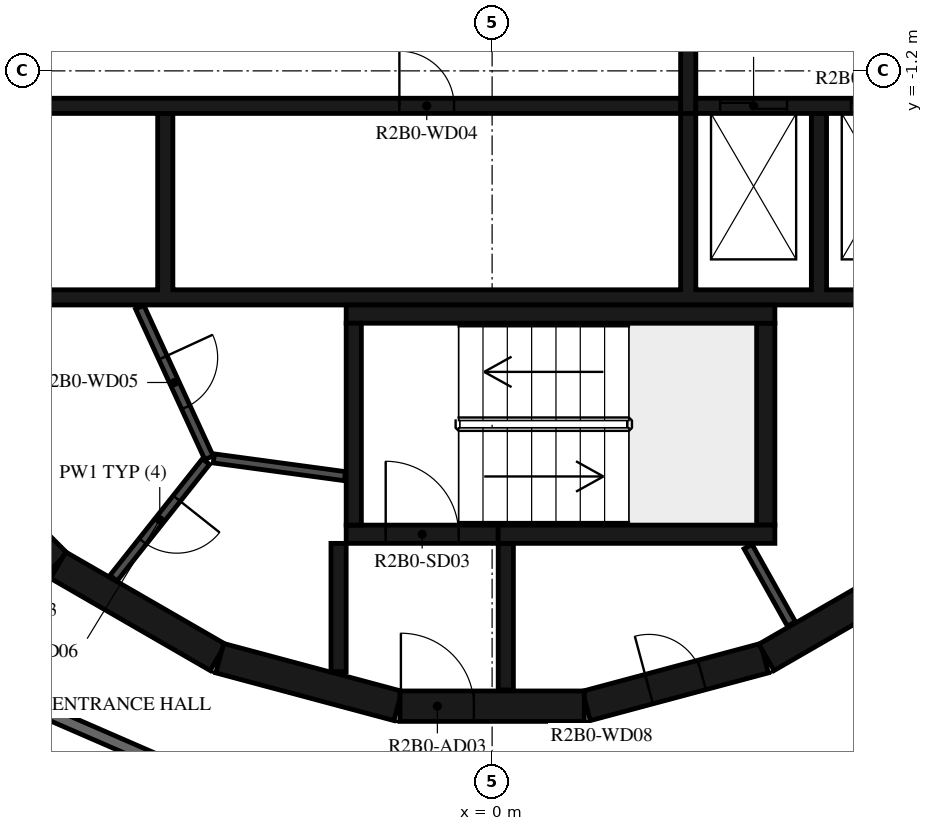
"""IFC4 building model, lengths in metres.
Left out: names, types, materials, properties, quantities, classifications, styles, units other than length and angle.
Written with IfcOpenShell. Run it as: python <this file> out.ifc"""

import sys

from ifc_helpers import new_model, si_unit, direction, frame, frame_2d, origin, place, context, subcontext, project, spatial, polyline, rectangle, outline, extrude, element, fill, save


model = new_model("IFC4")
c1 = context("Model", 3, precision=1e-05, world=origin(), true_north=direction((0.0, 1.0)))
c2 = subcontext(c1, "Body", "Model", "MODEL_VIEW")
j1 = project(units=[si_unit("LENGTHUNIT", "METRE"), si_unit("PLANEANGLEUNIT", "RADIAN")], contexts=[c1])
p1 = place(None, origin())
s1 = spatial("IfcSite", under=j1, at=p1, CompositionType="ELEMENT")
p2 = place(p1, origin())
s2 = spatial("IfcBuilding", under=s1, at=p2, CompositionType="ELEMENT")
p3 = place(p2, frame((0.0, 0.0, 90.7)))
s3 = spatial("IfcBuildingStorey", under=s2, at=p3, CompositionType="ELEMENT", Elevation=90.7)
p4 = place(p3, frame((1.55, -11.643, 0.0), z_axis=(0.0, 0.0, 1.0), x_axis=(0.965948410781, 0.258734743916, 0.0)))
e1 = element("IfcWall", 1, at=p4, inside=s3, PredefinedType="SHEAR", context=c2, shape_type="SweptSolid", body=[
    extrude(rectangle(XDim=3.033, YDim=0.5, at=frame_2d((1.516, 0.0))), origin(), (0.0, 0.0, 1.0), 3.12),
])
p5 = place(p4, frame((1.066, 0.0, 0.0)))
e2 = element("IfcOpeningElement", 2, at=p5, cuts=e1, PredefinedType="OPENING", context=c2, shape_type="SweptSolid", body=[
    extrude(rectangle(XDim=0.9, YDim=2.1, at=frame_2d((0.45, 1.05))), frame((0.0, 0.26, 0.0), z_axis=(0.0, -1.0, 0.0), x_axis=(1.0, 0.0, 0.0)), (0.0, 0.0, 1.0), 0.52),
])
p6 = place(p3, frame((4.51, -10.845, 0.0), z_axis=(0.0, 0.0, 1.0), x_axis=(0.865975092491, 0.500087131594, 0.0)))
e3 = element("IfcWall", 3, at=p6, inside=s3, PredefinedType="SHEAR", context=c2, shape_type="SweptSolid", body=[
    extrude(rectangle(XDim=3.033, YDim=0.5, at=frame_2d((1.516, 0.0))), origin(), (0.0, 0.0, 1.0), 3.12),
])
p7 = place(p3, frame((-9.308, -7.164, 0.0), z_axis=(0.0, 0.0, 1.0), x_axis=(0.707106781187, -0.707106781187, 0.0)))
e4 = element("IfcWall", 4, at=p7, inside=s3, PredefinedType="SHEAR", context=c2, shape_type="SweptSolid", body=[
    extrude(rectangle(XDim=3.032, YDim=0.5, at=frame_2d((1.516, 0.0))), origin(), (0.0, 0.0, 1.0), 3.12),
])
for number, where, z_axis, x_axis in (
    (5, (-7.137, -9.329, 0.0), (0.0, 0.0, 1.0), (0.866, -0.5, 0.0)),
    (6, (-4.479, -10.858, 0.0), (0.0, 0.0, 1.0), (0.966, -0.259, 0.0)),
):
    element("IfcWall", number, at=place(p3, frame(where, z_axis=z_axis, x_axis=x_axis)), inside=s3, PredefinedType="SHEAR", context=c2, shape_type="SweptSolid", body=[
        extrude(rectangle(XDim=3.033, YDim=0.5, at=frame_2d((1.516, 0.0))), origin(), (0.0, 0.0, 1.0), 3.12),
    ])
p8 = place(p3, frame((-1.516, -11.647, 0.0), z_axis=(0.0, 0.0, 1.0), x_axis=(1.0, 0.0, 0.0)))
e7 = element("IfcWall", 7, at=p8, inside=s3, PredefinedType="SHEAR", context=c2, shape_type="SweptSolid", body=[
    extrude(rectangle(XDim=3.033, YDim=0.5, at=frame_2d((1.516, 0.0))), origin(), (0.0, 0.0, 1.0), 3.12),
])
p9 = place(p8, frame((0.016, 0.0, 0.0)))
e8 = element("IfcOpeningElement", 8, at=p9, cuts=e7, PredefinedType="OPENING", context=c2, shape_type="SweptSolid", body=[
    extrude(rectangle(XDim=1.2, YDim=2.1, at=frame_2d((0.6, 1.05))), frame((0.0, 0.26, 0.0), z_axis=(0.0, -1.0, 0.0), x_axis=(1.0, 0.0, 0.0)), (0.0, 0.0, 1.0), 0.52),
])
p10 = place(p3, frame((-2.275, -8.67, 0.0), z_axis=(0.0, 0.0, 1.0), x_axis=(0.0, 1.0, 0.0)))
e9 = element("IfcWall", 9, at=p10, inside=s3, PredefinedType="SHEAR", context=c2, shape_type="SweptSolid", body=[
    extrude(rectangle(XDim=3.32, YDim=0.25, at=frame_2d((1.66, 0.0))), origin(), (0.0, 0.0, 1.0), 3.12),
])
p11 = place(p3, frame((-2.4, -5.2, 0.0), z_axis=(0.0, 0.0, 1.0), x_axis=(1.0, 0.0, 0.0)))
e10 = element("IfcWall", 10, at=p11, inside=s3, PredefinedType="SHEAR", context=c2, shape_type="SweptSolid", body=[
    extrude(rectangle(XDim=7.05, YDim=0.3, at=frame_2d((3.525, 0.0))), origin(), (0.0, 0.0, 1.0), 3.12),
])
p12 = place(p3, frame((4.5, -8.67, 0.0), z_axis=(0.0, 0.0, 1.0), x_axis=(0.0, 1.0, 0.0)))
e11 = element("IfcWall", 11, at=p12, inside=s3, PredefinedType="SHEAR", context=c2, shape_type="SweptSolid", body=[
    extrude(rectangle(XDim=3.32, YDim=0.3, at=frame_2d((1.66, 0.0))), origin(), (0.0, 0.0, 1.0), 3.12),
])
p13 = place(p3, frame((0.1, -8.82, 0.0), z_axis=(0.0, 0.0, 1.0), x_axis=(1.0, 0.0, 0.0)))
e12 = element("IfcWall", 12, at=p13, inside=s3, PredefinedType="SHEAR", context=c2, shape_type="SweptSolid", body=[
    extrude(rectangle(XDim=4.55, YDim=0.3, at=frame_2d((2.275, 0.0))), origin(), (0.0, 0.0, 1.0), 3.12),
])
p14 = place(p3, frame((-2.4, -8.82, 0.0), z_axis=(0.0, 0.0, 1.0), x_axis=(1.0, 0.0, 0.0)))
e13 = element("IfcWall", 13, at=p14, inside=s3, PredefinedType="SHEAR", context=c2, shape_type="SweptSolid", body=[
    extrude(rectangle(XDim=2.5, YDim=0.3, at=frame_2d((1.25, 0.0))), origin(), (0.0, 0.0, 1.0), 3.12),
])
p15 = place(p14, frame((0.65, 0.0, 0.0)))
e14 = element("IfcOpeningElement", 14, at=p15, cuts=e13, PredefinedType="OPENING", context=c2, shape_type="SweptSolid", body=[
    extrude(rectangle(XDim=1.2, YDim=2.1, at=frame_2d((0.6, 1.05))), frame((0.0, 0.16, 0.0), z_axis=(0.0, -1.0, 0.0), x_axis=(1.0, 0.0, 0.0)), (0.0, 0.0, 1.0), 0.32),
])
p16 = place(p3, frame((-2.525, -8.97, 0.0), z_axis=(0.0, 0.0, 1.0), x_axis=(0.0, -1.0, 0.0)))
e15 = element("IfcWall", 15, at=p16, inside=s3, PredefinedType="SHEAR", context=c2, shape_type="SweptSolid", body=[
    extrude(rectangle(XDim=2.11, YDim=0.25, at=frame_2d((1.055, 0.0))), origin(), (0.0, 0.0, 1.0), 3.12),
])
p17 = place(p3, frame((0.225, -8.97, 0.0), z_axis=(0.0, 0.0, 1.0), x_axis=(0.0, -1.0, 0.0)))
e16 = element("IfcWall", 16, at=p17, inside=s3, PredefinedType="SHEAR", context=c2, shape_type="SweptSolid", body=[
    extrude(rectangle(XDim=2.41, YDim=0.25, at=frame_2d((1.205, 0.0))), origin(), (0.0, 0.0, 1.0), 3.12),
])
p18 = place(p3, origin())
e17 = element("IfcWall", 17, at=p18, inside=s3, PredefinedType="SHEAR", context=c2, shape_type="SweptSolid", body=[
    extrude(outline(polyline([(9.8, -5.05), (9.8, -4.8), (9.8, -1.9), (9.55, -1.9), (9.55, -4.8), (7.65, -4.8), (7.65, -1.9), (7.4, -1.9), (7.4, -4.8), (5.5, -4.8), (5.5, -1.9), (5.25, -1.9), (5.25, -4.8), (3.35, -4.8), (3.35, -1.9), (3.1, -1.9), (3.1, -4.8), (-5.25, -4.8), (-5.25, -1.9), (-5.5, -1.9), (-5.5, -4.8), (-7.4, -4.8), (-7.4, -1.9), (-7.65, -1.9), (-7.65, -4.8), (-9.55, -4.8), (-9.55, -1.9), (-9.8, -1.9), (-9.8, -4.8), (-9.8, -5.05), (9.8, -5.05)])), origin(), (0.0, 0.0, 1.0), 3.12),
])
p19 = place(p3, frame((-11.28, -1.775, 0.0), z_axis=(0.0, 0.0, 1.0), x_axis=(1.0, 0.0, 0.0)))
e18 = element("IfcWall", 18, at=p19, inside=s3, PredefinedType="SHEAR", context=c2, shape_type="SweptSolid", body=[
    extrude(rectangle(XDim=14.38, YDim=0.25, at=frame_2d((7.19, 0.0))), origin(), (0.0, 0.0, 1.0), 3.12),
])
p20 = place(p19, frame((9.755, 0.0, 0.0)))
e19 = element("IfcOpeningElement", 19, at=p20, cuts=e18, PredefinedType="OPENING", context=c2, shape_type="SweptSolid", body=[
    extrude(rectangle(XDim=0.9, YDim=2.1, at=frame_2d((0.45, 1.05))), frame((0.0, 0.135, 0.0), z_axis=(0.0, -1.0, 0.0), x_axis=(1.0, 0.0, 0.0)), (0.0, 0.0, 1.0), 0.27),
])
p21 = place(p3, frame((3.35, -1.775, 0.0), z_axis=(0.0, 0.0, 1.0), x_axis=(1.0, 0.0, 0.0)))
e20 = element("IfcWall", 20, at=p21, inside=s3, PredefinedType="SHEAR", context=c2, shape_type="SweptSolid", body=[
    extrude(rectangle(XDim=7.93, YDim=0.25, at=frame_2d((3.965, 0.0))), origin(), (0.0, 0.0, 1.0), 3.12),
])
p22 = place(p21, frame((0.4, 0.0, 0.0)))
e21 = element("IfcOpeningElement", 21, at=p22, cuts=e20, PredefinedType="OPENING", context=c2, shape_type="SweptSolid", body=[
    extrude(rectangle(XDim=1.1, YDim=2.4, at=frame_2d((0.55, 1.2))), frame((0.0, 0.135, 0.0), z_axis=(0.0, -1.0, 0.0), x_axis=(1.0, 0.0, 0.0)), (0.0, 0.0, 1.0), 0.27),
])
p23 = place(p21, frame((2.55, 0.0, 0.0)))
e22 = element("IfcOpeningElement", 22, at=p23, cuts=e20, PredefinedType="OPENING", context=c2, shape_type="SweptSolid", body=[
    extrude(rectangle(XDim=1.1, YDim=2.4, at=frame_2d((0.55, 1.2))), frame((0.0, 0.135, 0.0), z_axis=(0.0, -1.0, 0.0), x_axis=(1.0, 0.0, 0.0)), (0.0, 0.0, 1.0), 0.27),
])
p24 = place(p21, frame((4.7, 0.0, 0.0)))
e23 = element("IfcOpeningElement", 23, at=p24, cuts=e20, PredefinedType="OPENING", context=c2, shape_type="SweptSolid", body=[
    extrude(rectangle(XDim=1.1, YDim=2.4, at=frame_2d((0.55, 1.2))), frame((0.0, 0.135, 0.0), z_axis=(0.0, -1.0, 0.0), x_axis=(1.0, 0.0, 0.0)), (0.0, 0.0, 1.0), 0.27),
])
p25 = place(p3, frame((3.225, -1.9, 0.0), z_axis=(0.0, 0.0, 1.0), x_axis=(0.0, 1.0, 0.0)))
e24 = element("IfcWall", 24, at=p25, inside=s3, PredefinedType="SHEAR", context=c2, shape_type="SweptSolid", body=[
    extrude(rectangle(XDim=3.8, YDim=0.25, at=frame_2d((1.9, 0.0))), origin(), (0.0, 0.0, 1.0), 3.12),
])
p26 = place(p3, frame((4.922, -10.296, 0.0), z_axis=(0.0, 0.0, 1.0), x_axis=(-0.48860846254, 0.872503163509, 0.0)))
e25 = element("IfcWall", 25, at=p26, inside=s3, PredefinedType="PARTITIONING", context=c2, shape_type="SweptSolid", body=[
    extrude(rectangle(XDim=1.459, YDim=0.15, at=frame_2d((0.73, 0.0))), origin(), (0.0, 0.0, 1.0), 3.12),
])
p27 = place(p3, frame((-5.795, -5.086, 0.0), z_axis=(0.0, 0.0, 1.0), x_axis=(0.417887867606, -0.908498613157, 0.0)))
e26 = element("IfcWall", 26, at=p27, inside=s3, PredefinedType="PARTITIONING", context=c2, shape_type="SweptSolid", body=[
    extrude(rectangle(XDim=2.726, YDim=0.15, at=frame_2d((1.363, 0.0))), origin(), (0.0, 0.0, 1.0), 3.12),
])
p28 = place(p27, frame((0.913, 0.0, 0.0)))
e27 = element("IfcOpeningElement", 27, at=p28, cuts=e26, PredefinedType="OPENING", context=c2, shape_type="SweptSolid", body=[
    extrude(rectangle(XDim=0.9, YDim=2.1, at=frame_2d((0.45, 1.05))), frame((0.0, 0.085, 0.0), z_axis=(0.0, -1.0, 0.0), x_axis=(1.0, 0.0, 0.0)), (0.0, 0.0, 1.0), 0.17),
])
p29 = place(p3, frame((-4.706, -7.625, 0.0), z_axis=(0.0, 0.0, 1.0), x_axis=(-0.621392599334, -0.783499353856, 0.0)))
e28 = element("IfcWall", 28, at=p29, inside=s3, PredefinedType="PARTITIONING", context=c2, shape_type="SweptSolid", body=[
    extrude(rectangle(XDim=2.447, YDim=0.15, at=frame_2d((1.224, 0.0))), origin(), (0.0, 0.0, 1.0), 3.12),
])
p30 = place(p29, frame((0.774, 0.0, 0.0)))
e29 = element("IfcOpeningElement", 29, at=p30, cuts=e28, PredefinedType="OPENING", context=c2, shape_type="SweptSolid", body=[
    extrude(rectangle(XDim=0.9, YDim=2.1, at=frame_2d((0.45, 1.05))), frame((0.0, 0.085, 0.0), z_axis=(0.0, -1.0, 0.0), x_axis=(1.0, 0.0, 0.0)), (0.0, 0.0, 1.0), 0.17),
])
p31 = place(p3, frame((-2.42, -7.865, 0.0), z_axis=(0.0, 0.0, 1.0), x_axis=(-0.990972299108, 0.134066783362, 0.0)))
e30 = element("IfcWall", 30, at=p31, inside=s3, PredefinedType="PARTITIONING", context=c2, shape_type="SweptSolid", body=[
    extrude(rectangle(XDim=2.176, YDim=0.15, at=frame_2d((1.088, 0.0))), origin(), (0.0, 0.0, 1.0), 3.12),
])
p32 = place(p3, frame((-8.829, -11.1, 0.0), z_axis=(0.0, 0.0, 1.0), x_axis=(0.917063622491, -0.398740908742, 0.0)))
e31 = element("IfcWall", 31, at=p32, inside=s3, PredefinedType="STANDARD", context=c2, shape_type="SweptSolid", body=[
    extrude(rectangle(XDim=7.24, YDim=0.2, at=frame_2d((3.62, 0.0))), origin(), (0.0, 0.0, 1.0), 3.12),
])
p33 = place(p32, frame((6.04, 0.0, 0.0)))
e32 = element("IfcOpeningElement", 32, at=p33, cuts=e31, PredefinedType="OPENING", context=c2, shape_type="SweptSolid", body=[
    extrude(rectangle(XDim=1.0, YDim=2.1, at=frame_2d((0.5, 1.05))), frame((0.0, 0.11, 0.0), z_axis=(0.0, -1.0, 0.0), x_axis=(1.0, 0.0, 0.0)), (0.0, 0.0, 1.0), 0.22),
])
p34 = place(p3, frame((5.198, -13.196, 0.0), z_axis=(0.0, 0.0, 1.0), x_axis=(0.803869883159, 0.594805187394, 0.0)))
e33 = element("IfcWall", 33, at=p34, inside=s3, PredefinedType="STANDARD", context=c2, shape_type="SweptSolid", body=[
    extrude(rectangle(XDim=7.342, YDim=0.2, at=frame_2d((3.671, 0.0))), origin(), (0.0, 0.0, 1.0), 3.12),
])
p35 = place(p3, frame((-9.796, -12.315, 0.0), z_axis=(0.0, 0.0, 1.0), x_axis=(0.917059572812, -0.398750222463, 0.0)))
e34 = element("IfcWall", 34, at=p35, inside=s3, PredefinedType="PARTITIONING", context=c2, shape_type="SweptSolid", body=[
    extrude(rectangle(XDim=8.146, YDim=0.12, at=frame_2d((4.073, 0.0))), origin(), (0.0, 0.0, 1.0), 3.12),
])
p36 = place(p35, frame((0.969, 0.0, 0.0)))
e35 = element("IfcOpeningElement", 35, at=p36, cuts=e34, PredefinedType="OPENING", context=c2, shape_type="SweptSolid", body=[
    extrude(rectangle(XDim=0.8, YDim=2.1, at=frame_2d((0.4, 1.05))), frame((0.0, 0.07, 0.0), z_axis=(0.0, -1.0, 0.0), x_axis=(1.0, 0.0, 0.0)), (0.0, 0.0, 1.0), 0.14),
])
p37 = place(p3, frame((5.767, -14.641, 0.0), z_axis=(0.0, 0.0, 1.0), x_axis=(0.803867427863, 0.594808505673, 0.0)))
e36 = element("IfcWall", 36, at=p37, inside=s3, PredefinedType="PARTITIONING", context=c2, shape_type="SweptSolid", body=[
    extrude(rectangle(XDim=7.316, YDim=0.12, at=frame_2d((3.658, 0.0))), origin(), (0.0, 0.0, 1.0), 3.12),
])
p38 = place(p37, frame((0.2, 0.0, 0.0)))
e37 = element("IfcOpeningElement", 37, at=p38, cuts=e36, PredefinedType="OPENING", context=c2, shape_type="SweptSolid", body=[
    extrude(rectangle(XDim=0.9, YDim=2.1, at=frame_2d((0.45, 1.05))), frame((0.0, 0.07, 0.0), z_axis=(0.0, -1.0, 0.0), x_axis=(1.0, 0.0, 0.0)), (0.0, 0.0, 1.0), 0.14),
])
p39 = place(p37, frame((5.385, 0.0, 0.0)))
e38 = element("IfcOpeningElement", 38, at=p39, cuts=e36, PredefinedType="OPENING", context=c2, shape_type="SweptSolid", body=[
    extrude(rectangle(XDim=0.8, YDim=2.1, at=frame_2d((0.4, 1.05))), frame((0.0, 0.07, 0.0), z_axis=(0.0, -1.0, 0.0), x_axis=(1.0, 0.0, 0.0)), (0.0, 0.0, 1.0), 0.14),
])
p40 = place(p15, origin())
e39 = element("IfcDoor", 39, at=p40, inside=s3, OperationType="SINGLE_SWING_LEFT", PredefinedType="DOOR", context=c2, shape_type="SweptSolid", body=[
    extrude(rectangle(XDim=1.2, YDim=2.1, at=frame_2d((0.6, 1.05))), frame((0.0, 0.025, 0.0), z_axis=(0.0, -1.0, 0.0), x_axis=(1.0, 0.0, 0.0)), (0.0, 0.0, 1.0), 0.05),
])
fill(e14, e39)
p41 = place(p9, origin())
e40 = element("IfcDoor", 40, at=p41, inside=s3, OperationType="SINGLE_SWING_RIGHT", PredefinedType="DOOR", context=c2, shape_type="SweptSolid", body=[
    extrude(rectangle(XDim=1.2, YDim=2.1, at=frame_2d((0.6, 1.05))), frame((0.0, 0.025, 0.0), z_axis=(0.0, -1.0, 0.0), x_axis=(1.0, 0.0, 0.0)), (0.0, 0.0, 1.0), 0.05),
])
fill(e8, e40)
p42 = place(p22, origin())
e41 = element("IfcDoor", 41, at=p42, inside=s3, OperationType="DOUBLE_DOOR_SLIDING", PredefinedType="DOOR", context=c2, shape_type="SweptSolid", body=[
    extrude(rectangle(XDim=1.1, YDim=2.4, at=frame_2d((0.55, 1.2))), frame((0.0, 0.025, 0.0), z_axis=(0.0, -1.0, 0.0), x_axis=(1.0, 0.0, 0.0)), (0.0, 0.0, 1.0), 0.05),
])
fill(e21, e41)
p43 = place(p23, origin())
e42 = element("IfcDoor", 42, at=p43, inside=s3, OperationType="DOUBLE_DOOR_SLIDING", PredefinedType="DOOR", context=c2, shape_type="SweptSolid", body=[
    extrude(rectangle(XDim=1.1, YDim=2.4, at=frame_2d((0.55, 1.2))), frame((0.0, 0.025, 0.0), z_axis=(0.0, -1.0, 0.0), x_axis=(1.0, 0.0, 0.0)), (0.0, 0.0, 1.0), 0.05),
])
fill(e22, e42)
p44 = place(p20, origin())
e43 = element("IfcDoor", 43, at=p44, inside=s3, OperationType="SINGLE_SWING_LEFT", PredefinedType="DOOR", context=c2, shape_type="SweptSolid", body=[
    extrude(rectangle(XDim=0.9, YDim=2.1, at=frame_2d((0.45, 1.05))), frame((0.0, 0.025, 0.0), z_axis=(0.0, -1.0, 0.0), x_axis=(1.0, 0.0, 0.0)), (0.0, 0.0, 1.0), 0.05),
])
fill(e19, e43)
p45 = place(p28, origin())
e44 = element("IfcDoor", 44, at=p45, inside=s3, OperationType="SINGLE_SWING_RIGHT", PredefinedType="DOOR", context=c2, shape_type="SweptSolid", body=[
    extrude(rectangle(XDim=0.9, YDim=2.1, at=frame_2d((0.45, 1.05))), frame((0.0, 0.025, 0.0), z_axis=(0.0, -1.0, 0.0), x_axis=(1.0, 0.0, 0.0)), (0.0, 0.0, 1.0), 0.05),
])
fill(e27, e44)
p46 = place(p30, origin())
e45 = element("IfcDoor", 45, at=p46, inside=s3, OperationType="SINGLE_SWING_LEFT", PredefinedType="DOOR", context=c2, shape_type="SweptSolid", body=[
    extrude(rectangle(XDim=0.9, YDim=2.1, at=frame_2d((0.45, 1.05))), frame((0.0, 0.025, 0.0), z_axis=(0.0, -1.0, 0.0), x_axis=(1.0, 0.0, 0.0)), (0.0, 0.0, 1.0), 0.05),
])
fill(e29, e45)
p47 = place(p5, origin())
e46 = element("IfcDoor", 46, at=p47, inside=s3, OperationType="SINGLE_SWING_LEFT", PredefinedType="DOOR", context=c2, shape_type="SweptSolid", body=[
    extrude(rectangle(XDim=0.9, YDim=2.1, at=frame_2d((0.45, 1.05))), frame((0.0, 0.025, 0.0), z_axis=(0.0, -1.0, 0.0), x_axis=(1.0, 0.0, 0.0)), (0.0, 0.0, 1.0), 0.05),
])
fill(e2, e46)
save(model, sys.argv[1])
